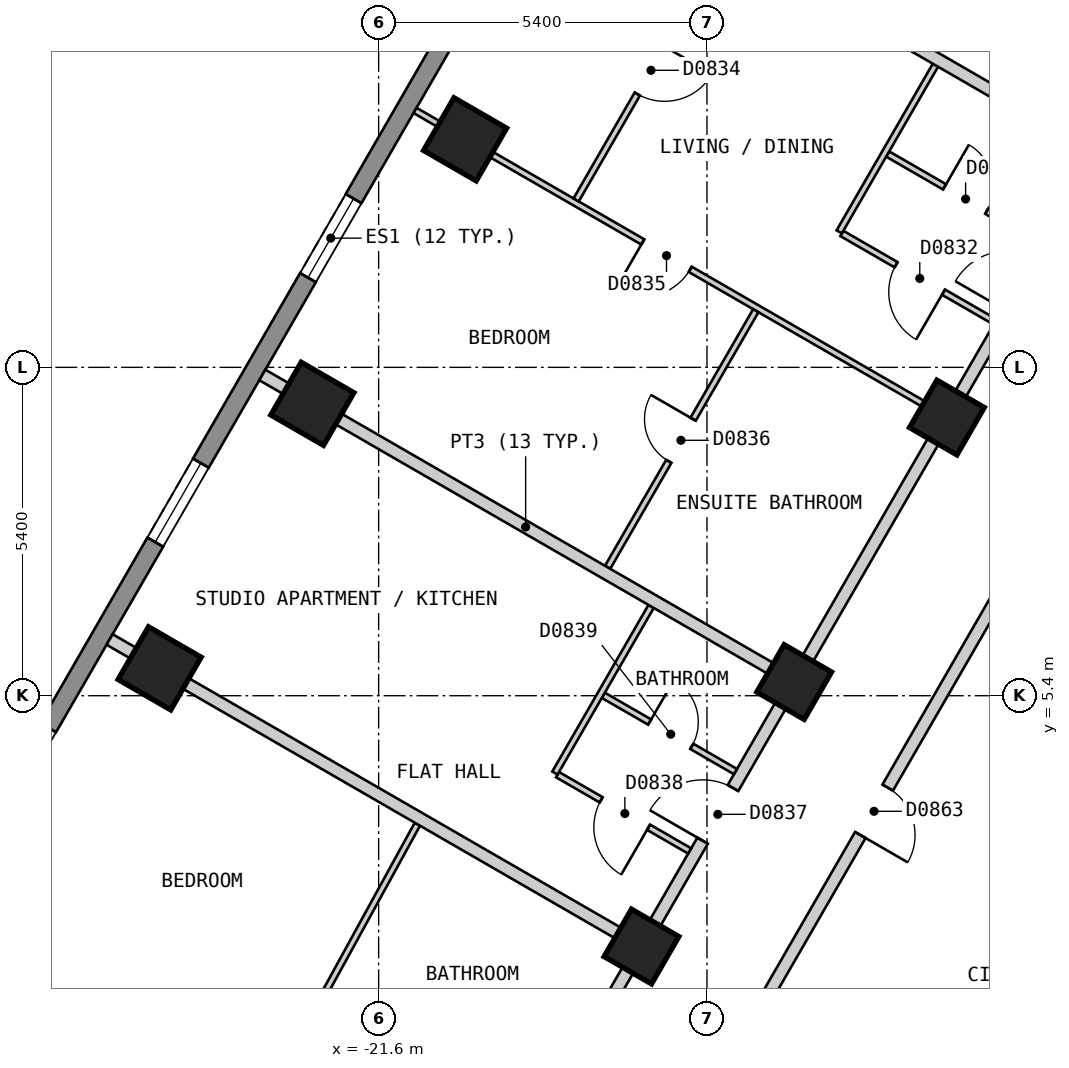
"""IFC4 building model, lengths in metres.
Left out: names, types, materials, properties, quantities, classifications, styles, units other than length and angle.
Written with IfcOpenShell. Run it as: python <this file> out.ifc"""

import sys

from ifc_helpers import new_model, si_unit, direction, frame, frame_2d, origin, origin_2d, place, context, subcontext, project, spatial, polyline, rectangle, outline, extrude, element, fill, save


model = new_model("IFC4")
c1 = context("Model", 3, precision=1e-05, world=origin(), true_north=direction((0.0, 1.0)))
c2 = subcontext(c1, "Body", "Model", "MODEL_VIEW")
j1 = project(units=[si_unit("LENGTHUNIT", "METRE"), si_unit("PLANEANGLEUNIT", "RADIAN")], contexts=[c1])
p1 = place(None, origin())
s1 = spatial("IfcSite", under=j1, at=p1, CompositionType="ELEMENT")
p2 = place(p1, origin())
s2 = spatial("IfcBuilding", under=s1, at=p2, CompositionType="ELEMENT")
p3 = place(p2, frame((0.0, 0.0, 84.0)))
s3 = spatial("IfcBuildingStorey", under=s2, at=p3, CompositionType="ELEMENT", Elevation=84.0)
for number, where, z_axis, x_axis in (
    (1, (-20.178, 14.55, 0.0), (0.0, 0.0, 1.0), (-0.5, -0.866, 0.0)),
    (2, (-22.69, 10.2, 0.0), (0.0, 0.0, 1.0), (-0.5, -0.866, 0.0)),
    (3, (-25.202, 5.85, 0.0), (0.0, 0.0, 1.0), (-0.5, -0.866, 0.0)),
):
    element("IfcColumn", number, at=place(p3, frame(where, z_axis=z_axis, x_axis=x_axis)), inside=s3, PredefinedType="COLUMN", context=c2, shape_type="SweptSolid", body=[
        extrude(rectangle(XDim=1.0, YDim=1.0, at=origin_2d()), origin(), (0.0, 0.0, 1.0), 3.0),
    ])
for number, where, z_axis, x_axis in (
    (4, (-12.254, 9.975, 0.0), (0.0, 0.0, 1.0), (-0.5, -0.866, 0.0)),
    (5, (-14.766, 5.625, 0.0), (0.0, 0.0, 1.0), (-0.5, -0.866, 0.0)),
    (6, (-17.277, 1.275, 0.0), (0.0, 0.0, 1.0), (-0.5, -0.866, 0.0)),
):
    element("IfcColumn", number, at=place(p3, frame(where, z_axis=z_axis, x_axis=x_axis)), inside=s3, PredefinedType="COLUMN", context=c2, shape_type="SweptSolid", body=[
        extrude(rectangle(XDim=0.9, YDim=0.9, at=origin_2d()), origin(), (0.0, 0.0, 1.0), 3.0),
    ])
p4 = place(p3, frame((-15.747, 24.425, 0.0), z_axis=(0.0, 0.0, 1.0), x_axis=(-0.500027479704, -0.866009537788, 0.0)))
e7 = element("IfcWall", 7, at=p4, inside=s3, PredefinedType="SOLIDWALL", context=c2, shape_type="SweptSolid", body=[
    extrude(outline(polyline([(0.0, -0.15), (26.559, -0.15), (26.478, 0.15), (0.08, 0.15), (0.0, -0.15)])), origin(), (0.0, 0.0, 1.0), 2.7),
])
p5 = place(p4, frame((2.483, 0.0, 0.15)))
e8 = element("IfcOpeningElement", 8, at=p5, cuts=e7, PredefinedType="OPENING", context=c2, shape_type="SweptSolid", body=[
    extrude(rectangle(XDim=1.5, YDim=2.1, at=frame_2d((0.75, 1.05))), frame((0.0, 0.16, 0.0), z_axis=(0.0, -1.0, 0.0), x_axis=(1.0, 0.0, 0.0)), (0.0, 0.0, 1.0), 0.32),
])
p6 = place(p4, frame((7.506, 0.0, 0.15)))
e9 = element("IfcOpeningElement", 9, at=p6, cuts=e7, PredefinedType="OPENING", context=c2, shape_type="SweptSolid", body=[
    extrude(rectangle(XDim=1.5, YDim=2.1, at=frame_2d((0.75, 1.05))), frame((0.0, 0.16, 0.0), z_axis=(0.0, -1.0, 0.0), x_axis=(1.0, 0.0, 0.0)), (0.0, 0.0, 1.0), 0.32),
])
p7 = place(p4, frame((12.529, 0.0, 0.15)))
e10 = element("IfcOpeningElement", 10, at=p7, cuts=e7, PredefinedType="OPENING", context=c2, shape_type="SweptSolid", body=[
    extrude(rectangle(XDim=1.5, YDim=2.1, at=frame_2d((0.75, 1.05))), frame((0.0, 0.16, 0.0), z_axis=(0.0, -1.0, 0.0), x_axis=(1.0, 0.0, 0.0)), (0.0, 0.0, 1.0), 0.32),
])
p8 = place(p4, frame((17.552, 0.0, 0.15)))
e11 = element("IfcOpeningElement", 11, at=p8, cuts=e7, PredefinedType="OPENING", context=c2, shape_type="SweptSolid", body=[
    extrude(rectangle(XDim=1.5, YDim=2.1, at=frame_2d((0.75, 1.05))), frame((0.0, 0.16, 0.0), z_axis=(0.0, -1.0, 0.0), x_axis=(1.0, 0.0, 0.0)), (0.0, 0.0, 1.0), 0.32),
])
p9 = place(p4, frame((22.575, 0.0, 0.15)))
e12 = element("IfcOpeningElement", 12, at=p9, cuts=e7, PredefinedType="OPENING", context=c2, shape_type="SweptSolid", body=[
    extrude(rectangle(XDim=1.5, YDim=2.1, at=frame_2d((0.75, 1.05))), frame((0.0, 0.16, 0.0), z_axis=(0.0, -1.0, 0.0), x_axis=(1.0, 0.0, 0.0)), (0.0, 0.0, 1.0), 0.32),
])
p10 = place(p3, frame((-16.05, -1.0, 0.0), z_axis=(0.0, 0.0, 1.0), x_axis=(0.499962449088, 0.866047082728, 0.0)))
e13 = element("IfcWall", 13, at=p10, inside=s3, PredefinedType="PARTITIONING", context=c2, shape_type="SweptSolid", body=[
    extrude(rectangle(XDim=10.391, YDim=0.2, at=frame_2d((5.195, 0.0))), origin(), (0.0, 0.0, 1.0), 2.7),
])
p11 = place(p10, frame((4.745, 0.0, 0.0)))
e14 = element("IfcOpeningElement", 14, at=p11, cuts=e13, PredefinedType="OPENING", context=c2, shape_type="SweptSolid", body=[
    extrude(rectangle(XDim=0.9, YDim=2.1, at=frame_2d((0.45, 1.05))), frame((0.0, 0.11, 0.0), z_axis=(0.0, -1.0, 0.0), x_axis=(1.0, 0.0, 0.0)), (0.0, 0.0, 1.0), 0.22),
])
p12 = place(p3, frame((-18.562, -0.951, 0.0), z_axis=(0.0, 0.0, 1.0), x_axis=(0.499992962407, 0.866029466902, 0.0)))
e15 = element("IfcWall", 15, at=p12, inside=s3, PredefinedType="PARTITIONING", context=c2, shape_type="SweptSolid", body=[
    extrude(rectangle(XDim=20.208, YDim=0.2, at=frame_2d((10.104, 0.0))), origin(), (0.0, 0.0, 1.0), 2.7),
])
p13 = place(p12, frame((14.627, 0.0, 0.0)))
e16 = element("IfcOpeningElement", 16, at=p13, cuts=e15, PredefinedType="OPENING", context=c2, shape_type="SweptSolid", body=[
    extrude(rectangle(XDim=1.0, YDim=2.1, at=frame_2d((0.5, 1.05))), frame((0.0, 0.11, 0.0), z_axis=(0.0, -1.0, 0.0), x_axis=(1.0, 0.0, 0.0)), (0.0, 0.0, 1.0), 0.22),
])
p14 = place(p12, frame((4.581, 0.0, 0.0)))
e17 = element("IfcOpeningElement", 17, at=p14, cuts=e15, PredefinedType="OPENING", context=c2, shape_type="SweptSolid", body=[
    extrude(rectangle(XDim=1.0, YDim=2.1, at=frame_2d((0.5, 1.05))), frame((0.0, 0.11, 0.0), z_axis=(0.0, -1.0, 0.0), x_axis=(1.0, 0.0, 0.0)), (0.0, 0.0, 1.0), 0.22),
])
p15 = place(p3, frame((-17.905, 5.407, 0.0), z_axis=(0.0, 0.0, 1.0), x_axis=(0.866080321209, -0.499904868165, 0.0)))
e18 = element("IfcWall", 18, at=p15, inside=s3, PredefinedType="PARTITIONING", context=c2, shape_type="SweptSolid", body=[
    extrude(rectangle(XDim=2.51, YDim=0.1, at=frame_2d((1.255, 0.0))), origin(), (0.0, 0.0, 1.0), 2.7),
])
p16 = place(p15, frame((0.88, 0.0, 0.0)))
e19 = element("IfcOpeningElement", 19, at=p16, cuts=e18, PredefinedType="OPENING", context=c2, shape_type="SweptSolid", body=[
    extrude(rectangle(XDim=0.8, YDim=2.1, at=frame_2d((0.4, 1.05))), frame((0.0, 0.06, 0.0), z_axis=(0.0, -1.0, 0.0), x_axis=(1.0, 0.0, 0.0)), (0.0, 0.0, 1.0), 0.12),
])
p17 = place(p3, frame((-18.658, 4.102, 0.0), z_axis=(0.0, 0.0, 1.0), x_axis=(0.865916579361, -0.500188442078, 0.0)))
e20 = element("IfcWall", 20, at=p17, inside=s3, PredefinedType="PARTITIONING", context=c2, shape_type="SweptSolid", body=[
    extrude(rectangle(XDim=2.509, YDim=0.1, at=frame_2d((1.255, 0.0))), origin(), (0.0, 0.0, 1.0), 2.7),
])
p18 = place(p17, frame((0.829, 0.0, 0.0)))
e21 = element("IfcOpeningElement", 21, at=p18, cuts=e20, PredefinedType="OPENING", context=c2, shape_type="SweptSolid", body=[
    extrude(rectangle(XDim=0.9, YDim=2.1, at=frame_2d((0.45, 1.05))), frame((0.0, 0.06, 0.0), z_axis=(0.0, -1.0, 0.0), x_axis=(1.0, 0.0, 0.0)), (0.0, 0.0, 1.0), 0.12),
])
p19 = place(p3, frame((-13.981, 13.002, 0.0), z_axis=(0.0, 0.0, 1.0), x_axis=(0.86595634977, -0.500119585993, 0.0)))
e22 = element("IfcWall", 22, at=p19, inside=s3, PredefinedType="PARTITIONING", context=c2, shape_type="SweptSolid", body=[
    extrude(rectangle(XDim=2.909, YDim=0.1, at=frame_2d((1.455, 0.0))), origin(), (0.0, 0.0, 1.0), 2.7),
])
p20 = place(p19, frame((1.029, 0.0, 0.0)))
e23 = element("IfcOpeningElement", 23, at=p20, cuts=e22, PredefinedType="OPENING", context=c2, shape_type="SweptSolid", body=[
    extrude(rectangle(XDim=0.9, YDim=2.1, at=frame_2d((0.45, 1.05))), frame((0.0, 0.06, 0.0), z_axis=(0.0, -1.0, 0.0), x_axis=(1.0, 0.0, 0.0)), (0.0, 0.0, 1.0), 0.12),
])
p21 = place(p3, frame((-13.228, 14.308, 0.0), z_axis=(0.0, 0.0, 1.0), x_axis=(0.866003949776, -0.500037157592, 0.0)))
e24 = element("IfcWall", 24, at=p21, inside=s3, PredefinedType="PARTITIONING", context=c2, shape_type="SweptSolid", body=[
    extrude(rectangle(XDim=2.91, YDim=0.1, at=frame_2d((1.455, 0.0))), origin(), (0.0, 0.0, 1.0), 2.7),
])
p22 = place(p21, frame((1.08, 0.0, 0.0)))
e25 = element("IfcOpeningElement", 25, at=p22, cuts=e24, PredefinedType="OPENING", context=c2, shape_type="SweptSolid", body=[
    extrude(rectangle(XDim=0.8, YDim=2.1, at=frame_2d((0.4, 1.05))), frame((0.0, 0.06, 0.0), z_axis=(0.0, -1.0, 0.0), x_axis=(1.0, 0.0, 0.0)), (0.0, 0.0, 1.0), 0.12),
])
p23 = place(p3, frame((-21.001, 15.025, 0.0), z_axis=(0.0, 0.0, 1.0), x_axis=(0.866016855193, -0.500014806302, 0.0)))
e26 = element("IfcWall", 26, at=p23, inside=s3, PredefinedType="PARTITIONING", context=c2, shape_type="SweptSolid", body=[
    extrude(rectangle(XDim=10.0, YDim=0.1, at=frame_2d((5.0, 0.0))), origin(), (0.0, 0.0, 1.0), 2.7),
])
p24 = place(p23, frame((4.325, 0.0, 0.0)))
e27 = element("IfcOpeningElement", 27, at=p24, cuts=e26, PredefinedType="OPENING", context=c2, shape_type="SweptSolid", body=[
    extrude(rectangle(XDim=0.9, YDim=2.1, at=frame_2d((0.45, 1.05))), frame((0.0, 0.06, 0.0), z_axis=(0.0, -1.0, 0.0), x_axis=(1.0, 0.0, 0.0)), (0.0, 0.0, 1.0), 0.12),
])
for number, where, z_axis, x_axis in (
    (28, (-18.701, 4.128, 0.0), (0.0, 0.0, 1.0), (0.5, 0.866, 0.0)),
    (29, (-14.025, 13.028, 0.0), (0.0, 0.0, 1.0), (0.5, 0.866, 0.0)),
):
    element("IfcWall", number, at=place(p3, frame(where, z_axis=z_axis, x_axis=x_axis)), inside=s3, PredefinedType="PARTITIONING", context=c2, shape_type="SweptSolid", body=[
        extrude(rectangle(XDim=3.164, YDim=0.1, at=frame_2d((1.582, 0.0))), origin(), (0.0, 0.0, 1.0), 2.7),
    ])
p25 = place(p3, frame((-17.834, 7.512, 0.0), z_axis=(0.0, 0.0, 1.0), x_axis=(0.500093956194, 0.865971151354, 0.0)))
e30 = element("IfcWall", 30, at=p25, inside=s3, PredefinedType="PARTITIONING", context=c2, shape_type="SweptSolid", body=[
    extrude(rectangle(XDim=4.873, YDim=0.1, at=frame_2d((2.437, 0.0))), origin(), (0.0, 0.0, 1.0), 2.7),
])
p26 = place(p25, frame((2.012, 0.0, 0.0)))
e31 = element("IfcOpeningElement", 31, at=p26, cuts=e30, PredefinedType="OPENING", context=c2, shape_type="SweptSolid", body=[
    extrude(rectangle(XDim=0.8, YDim=2.1, at=frame_2d((0.4, 1.05))), frame((0.0, 0.06, 0.0), z_axis=(0.0, -1.0, 0.0), x_axis=(1.0, 0.0, 0.0)), (0.0, 0.0, 1.0), 0.12),
])
p27 = place(p3, frame((-18.352, 13.553, 0.0), z_axis=(0.0, 0.0, 1.0), x_axis=(0.500007182864, 0.866021256716, 0.0)))
e32 = element("IfcWall", 32, at=p27, inside=s3, PredefinedType="PARTITIONING", context=c2, shape_type="SweptSolid", body=[
    extrude(rectangle(XDim=4.874, YDim=0.1, at=frame_2d((2.437, 0.0))), origin(), (0.0, 0.0, 1.0), 2.7),
])
p28 = place(p27, frame((2.012, 0.0, 0.0)))
e33 = element("IfcOpeningElement", 33, at=p28, cuts=e32, PredefinedType="OPENING", context=c2, shape_type="SweptSolid", body=[
    extrude(rectangle(XDim=0.9, YDim=2.1, at=frame_2d((0.45, 1.05))), frame((0.0, 0.06, 0.0), z_axis=(0.0, -1.0, 0.0), x_axis=(1.0, 0.0, 0.0)), (0.0, 0.0, 1.0), 0.12),
])
p29 = place(p3, frame((-23.289, -0.951, 0.0), z_axis=(0.0, 0.0, 1.0), x_axis=(0.481164463081, 0.876630343684, 0.0)))
e34 = element("IfcWall", 34, at=p29, inside=s3, PredefinedType="PARTITIONING", context=c2, shape_type="SweptSolid", body=[
    extrude(rectangle(XDim=4.834, YDim=0.1, at=frame_2d((2.417, 0.0))), origin(), (0.0, 0.0, 1.0), 2.7),
])
for number, where, z_axis, x_axis in (
    (35, (-26.025, 6.325, 0.0), (0.0, 0.0, 1.0), (0.866, -0.5, 0.0)),
    (36, (-23.513, 10.675, 0.0), (0.0, 0.0, 1.0), (0.866, -0.5, 0.0)),
):
    element("IfcWall", number, at=place(p3, frame(where, z_axis=z_axis, x_axis=x_axis)), inside=s3, PredefinedType="PARTITIONING", context=c2, shape_type="SweptSolid", body=[
        extrude(rectangle(XDim=10.0, YDim=0.2, at=frame_2d((5.0, 0.0))), origin(), (0.0, 0.0, 1.0), 2.7),
    ])
p30 = place(p3, frame((-18.489, 19.375, 0.0), z_axis=(0.0, 0.0, 1.0), x_axis=(0.866016855193, -0.500014806302, 0.0)))
e37 = element("IfcWall", 37, at=p30, inside=s3, PredefinedType="PARTITIONING", context=c2, shape_type="SweptSolid", body=[
    extrude(rectangle(XDim=10.0, YDim=0.2, at=frame_2d((5.0, 0.0))), origin(), (0.0, 0.0, 1.0), 2.7),
])
p31 = place(p7, origin())
e38 = element("IfcWindow", 38, at=p31, inside=s3, PartitioningType="SINGLE_PANEL", PredefinedType="WINDOW", context=c2, shape_type="SweptSolid", body=[
    extrude(rectangle(XDim=1.5, YDim=2.1, at=frame_2d((0.75, 1.05))), frame((0.0, 0.03, 0.0), z_axis=(0.0, -1.0, 0.0), x_axis=(1.0, 0.0, 0.0)), (0.0, 0.0, 1.0), 0.06),
])
fill(e10, e38)
p32 = place(p8, origin())
e39 = element("IfcWindow", 39, at=p32, inside=s3, PartitioningType="SINGLE_PANEL", PredefinedType="WINDOW", context=c2, shape_type="SweptSolid", body=[
    extrude(rectangle(XDim=1.5, YDim=2.1, at=frame_2d((0.75, 1.05))), frame((0.0, 0.03, 0.0), z_axis=(0.0, -1.0, 0.0), x_axis=(1.0, 0.0, 0.0)), (0.0, 0.0, 1.0), 0.06),
])
fill(e11, e39)
p33 = place(p20, origin())
e40 = element("IfcDoor", 40, at=p33, inside=s3, OperationType="SINGLE_SWING_RIGHT", PredefinedType="DOOR", context=c2, shape_type="SweptSolid", body=[
    extrude(rectangle(XDim=0.9, YDim=2.1, at=frame_2d((0.45, 1.05))), frame((0.0, 0.025, 0.0), z_axis=(0.0, -1.0, 0.0), x_axis=(1.0, 0.0, 0.0)), (0.0, 0.0, 1.0), 0.05),
])
fill(e23, e40)
p34 = place(p22, origin())
e41 = element("IfcDoor", 41, at=p34, inside=s3, OperationType="SINGLE_SWING_LEFT", PredefinedType="DOOR", context=c2, shape_type="SweptSolid", body=[
    extrude(rectangle(XDim=0.8, YDim=2.1, at=frame_2d((0.4, 1.05))), frame((0.0, 0.025, 0.0), z_axis=(0.0, -1.0, 0.0), x_axis=(1.0, 0.0, 0.0)), (0.0, 0.0, 1.0), 0.05),
])
fill(e25, e41)
p35 = place(p28, origin())
e42 = element("IfcDoor", 42, at=p35, inside=s3, OperationType="SINGLE_SWING_RIGHT", PredefinedType="DOOR", context=c2, shape_type="SweptSolid", body=[
    extrude(rectangle(XDim=0.9, YDim=2.1, at=frame_2d((0.45, 1.05))), frame((0.0, 0.025, 0.0), z_axis=(0.0, -1.0, 0.0), x_axis=(1.0, 0.0, 0.0)), (0.0, 0.0, 1.0), 0.05),
])
fill(e33, e42)
p36 = place(p24, origin())
e43 = element("IfcDoor", 43, at=p36, inside=s3, OperationType="SINGLE_SWING_LEFT", PredefinedType="DOOR", context=c2, shape_type="SweptSolid", body=[
    extrude(rectangle(XDim=0.9, YDim=2.1, at=frame_2d((0.45, 1.05))), frame((0.0, 0.025, 0.0), z_axis=(0.0, -1.0, 0.0), x_axis=(1.0, 0.0, 0.0)), (0.0, 0.0, 1.0), 0.05),
])
fill(e27, e43)
p37 = place(p26, origin())
e44 = element("IfcDoor", 44, at=p37, inside=s3, OperationType="SINGLE_SWING_RIGHT", PredefinedType="DOOR", context=c2, shape_type="SweptSolid", body=[
    extrude(rectangle(XDim=0.8, YDim=2.1, at=frame_2d((0.4, 1.05))), frame((0.0, 0.025, 0.0), z_axis=(0.0, -1.0, 0.0), x_axis=(1.0, 0.0, 0.0)), (0.0, 0.0, 1.0), 0.05),
])
fill(e31, e44)
p38 = place(p14, origin())
e45 = element("IfcDoor", 45, at=p38, inside=s3, OperationType="SINGLE_SWING_LEFT", PredefinedType="DOOR", context=c2, shape_type="SweptSolid", body=[
    extrude(rectangle(XDim=1.0, YDim=2.1, at=frame_2d((0.5, 1.05))), frame((0.0, 0.025, 0.0), z_axis=(0.0, -1.0, 0.0), x_axis=(1.0, 0.0, 0.0)), (0.0, 0.0, 1.0), 0.05),
])
fill(e17, e45)
p39 = place(p18, origin())
e46 = element("IfcDoor", 46, at=p39, inside=s3, OperationType="SINGLE_SWING_RIGHT", PredefinedType="DOOR", context=c2, shape_type="SweptSolid", body=[
    extrude(rectangle(XDim=0.9, YDim=2.1, at=frame_2d((0.45, 1.05))), frame((0.0, 0.025, 0.0), z_axis=(0.0, -1.0, 0.0), x_axis=(1.0, 0.0, 0.0)), (0.0, 0.0, 1.0), 0.05),
])
fill(e21, e46)
p40 = place(p16, origin())
e47 = element("IfcDoor", 47, at=p40, inside=s3, OperationType="SINGLE_SWING_LEFT", PredefinedType="DOOR", context=c2, shape_type="SweptSolid", body=[
    extrude(rectangle(XDim=0.8, YDim=2.1, at=frame_2d((0.4, 1.05))), frame((0.0, 0.025, 0.0), z_axis=(0.0, -1.0, 0.0), x_axis=(1.0, 0.0, 0.0)), (0.0, 0.0, 1.0), 0.05),
])
fill(e19, e47)
p41 = place(p11, origin())
e48 = element("IfcDoor", 48, at=p41, inside=s3, OperationType="SINGLE_SWING_LEFT", PredefinedType="DOOR", context=c2, shape_type="SweptSolid", body=[
    extrude(rectangle(XDim=0.9, YDim=2.1, at=frame_2d((0.45, 1.05))), frame((0.0, 0.025, 0.0), z_axis=(0.0, -1.0, 0.0), x_axis=(1.0, 0.0, 0.0)), (0.0, 0.0, 1.0), 0.05),
])
fill(e14, e48)
save(model, sys.argv[1])
